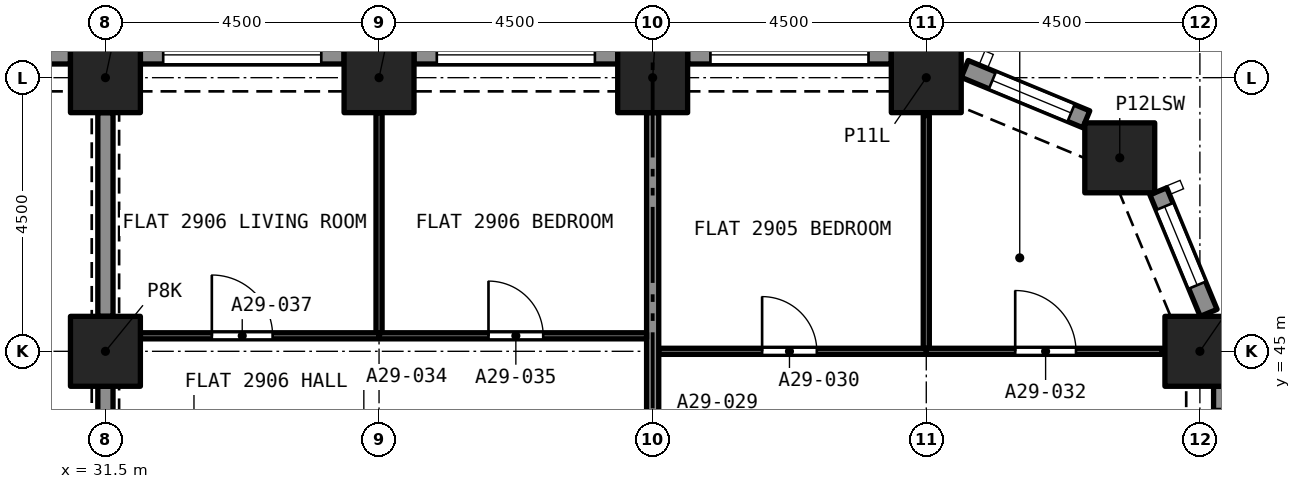
"""IFC4 building model, lengths in metres.
Left out: names, types, materials, properties, quantities, classifications, styles, units other than length and angle.
Written with IfcOpenShell. Run it as: python <this file> out.ifc"""

import sys

from ifc_helpers import new_model, si_unit, direction, frame, frame_2d, origin, origin_2d, place, context, subcontext, project, spatial, rectangle, extrude, element, fill, save


model = new_model("IFC4")
c1 = context("Model", 3, precision=1e-05, world=origin(), true_north=direction((0.0, 1.0)))
c2 = subcontext(c1, "Body", "Model", "MODEL_VIEW")
j1 = project(units=[si_unit("LENGTHUNIT", "METRE"), si_unit("PLANEANGLEUNIT", "RADIAN")], contexts=[c1])
p1 = place(None, origin())
s1 = spatial("IfcSite", under=j1, at=p1, CompositionType="ELEMENT")
p2 = place(p1, origin())
s2 = spatial("IfcBuilding", under=s1, at=p2, CompositionType="ELEMENT")
p3 = place(p2, frame((0.0, 0.0, 105.6)))
s3 = spatial("IfcBuildingStorey", under=s2, at=p3, CompositionType="ELEMENT", Elevation=105.6)
for number, where, z_axis, x_axis in (
    (1, (31.5, 45.0, 0.0), (0.0, 0.0, 1.0), (1.0, 0.0, 0.0)),
    (2, (49.5, 45.0, 0.0), (0.0, 0.0, 1.0), (1.0, 0.0, 0.0)),
    (3, (48.182, 48.182, 0.0), (0.0, 0.0, 1.0), (1.0, 0.0, 0.0)),
    (4, (31.5, 49.5, 0.0), (0.0, 0.0, 1.0), (1.0, 0.0, 0.0)),
    (5, (36.0, 49.5, 0.0), (0.0, 0.0, 1.0), (1.0, 0.0, 0.0)),
    (6, (40.5, 49.5, 0.0), (0.0, 0.0, 1.0), (1.0, 0.0, 0.0)),
    (7, (45.0, 49.5, 0.0), (0.0, 0.0, 1.0), (1.0, 0.0, 0.0)),
):
    element("IfcColumn", number, at=place(p3, frame(where, z_axis=z_axis, x_axis=x_axis)), inside=s3, PredefinedType="COLUMN", context=c2, shape_type="SweptSolid", body=[
        extrude(rectangle(XDim=1.15, YDim=1.15, at=origin_2d()), origin(), (0.0, 0.0, 1.0), 3.2),
    ])
p4 = place(p3, frame((49.875, 44.425, 0.0), z_axis=(0.0, 0.0, 1.0), x_axis=(0.0, -1.0, 0.0)))
e8 = element("IfcWall", 8, at=p4, inside=s3, PredefinedType="SOLIDWALL", context=c2, shape_type="SweptSolid", body=[
    extrude(rectangle(XDim=3.35, YDim=0.3, at=frame_2d((1.675, 0.0))), origin(), (0.0, 0.0, 1.0), 3.2),
])
p5 = place(p4, frame((0.375, 0.0, 0.45)))
e9 = element("IfcOpeningElement", 9, at=p5, cuts=e8, PredefinedType="OPENING", context=c2, shape_type="SweptSolid", body=[
    extrude(rectangle(XDim=2.6, YDim=1.95, at=frame_2d((1.3, 0.975))), frame((0.0, 0.16, 0.0), z_axis=(0.0, -1.0, 0.0), x_axis=(1.0, 0.0, 0.0)), (0.0, 0.0, 1.0), 0.32),
])
p6 = place(p3, frame((48.816, 47.631, 0.0), z_axis=(0.0, 0.0, 1.0), x_axis=(0.382723818695, -0.923862802911, 0.0)))
e10 = element("IfcWall", 10, at=p6, inside=s3, PredefinedType="SOLIDWALL", context=c2, shape_type="SweptSolid", body=[
    extrude(rectangle(XDim=2.164, YDim=0.3, at=frame_2d((1.082, 0.0))), origin(), (0.0, 0.0, 1.0), 3.2),
])
p7 = place(p6, frame((0.271, 0.0, 0.45)))
e11 = element("IfcOpeningElement", 11, at=p7, cuts=e10, PredefinedType="OPENING", context=c2, shape_type="SweptSolid", body=[
    extrude(rectangle(XDim=1.4, YDim=1.95, at=frame_2d((0.7, 0.975))), frame((0.0, 0.16, 0.0), z_axis=(0.0, -1.0, 0.0), x_axis=(1.0, 0.0, 0.0)), (0.0, 0.0, 1.0), 0.32),
])
p8 = place(p3, frame((45.632, 49.644, 0.0), z_axis=(0.0, 0.0, 1.0), x_axis=(0.923862802911, -0.382723818695, 0.0)))
e12 = element("IfcWall", 12, at=p8, inside=s3, PredefinedType="SOLIDWALL", context=c2, shape_type="SweptSolid", body=[
    extrude(rectangle(XDim=2.164, YDim=0.3, at=frame_2d((1.082, 0.0))), origin(), (0.0, 0.0, 1.0), 3.2),
])
p9 = place(p8, frame((0.493, 0.0, 0.45)))
e13 = element("IfcOpeningElement", 13, at=p9, cuts=e12, PredefinedType="OPENING", context=c2, shape_type="SweptSolid", body=[
    extrude(rectangle(XDim=1.4, YDim=1.95, at=frame_2d((0.7, 0.975))), frame((0.0, 0.16, 0.0), z_axis=(0.0, -1.0, 0.0), x_axis=(1.0, 0.0, 0.0)), (0.0, 0.0, 1.0), 0.32),
])
p10 = place(p3, frame((41.075, 49.875, 0.0), z_axis=(0.0, 0.0, 1.0), x_axis=(1.0, 0.0, 0.0)))
e14 = element("IfcWall", 14, at=p10, inside=s3, PredefinedType="SOLIDWALL", context=c2, shape_type="SweptSolid", body=[
    extrude(rectangle(XDim=3.35, YDim=0.3, at=frame_2d((1.675, 0.0))), origin(), (0.0, 0.0, 1.0), 3.2),
])
p11 = place(p10, frame((0.375, 0.0, 0.45)))
e15 = element("IfcOpeningElement", 15, at=p11, cuts=e14, PredefinedType="OPENING", context=c2, shape_type="SweptSolid", body=[
    extrude(rectangle(XDim=2.6, YDim=1.95, at=frame_2d((1.3, 0.975))), frame((0.0, 0.16, 0.0), z_axis=(0.0, -1.0, 0.0), x_axis=(1.0, 0.0, 0.0)), (0.0, 0.0, 1.0), 0.32),
])
p12 = place(p3, frame((36.575, 49.875, 0.0), z_axis=(0.0, 0.0, 1.0), x_axis=(1.0, 0.0, 0.0)))
e16 = element("IfcWall", 16, at=p12, inside=s3, PredefinedType="SOLIDWALL", context=c2, shape_type="SweptSolid", body=[
    extrude(rectangle(XDim=3.35, YDim=0.3, at=frame_2d((1.675, 0.0))), origin(), (0.0, 0.0, 1.0), 3.2),
])
p13 = place(p12, frame((0.375, 0.0, 0.45)))
e17 = element("IfcOpeningElement", 17, at=p13, cuts=e16, PredefinedType="OPENING", context=c2, shape_type="SweptSolid", body=[
    extrude(rectangle(XDim=2.6, YDim=1.95, at=frame_2d((1.3, 0.975))), frame((0.0, 0.16, 0.0), z_axis=(0.0, -1.0, 0.0), x_axis=(1.0, 0.0, 0.0)), (0.0, 0.0, 1.0), 0.32),
])
p14 = place(p3, frame((32.075, 49.875, 0.0), z_axis=(0.0, 0.0, 1.0), x_axis=(1.0, 0.0, 0.0)))
e18 = element("IfcWall", 18, at=p14, inside=s3, PredefinedType="SOLIDWALL", context=c2, shape_type="SweptSolid", body=[
    extrude(rectangle(XDim=3.35, YDim=0.3, at=frame_2d((1.675, 0.0))), origin(), (0.0, 0.0, 1.0), 3.2),
])
p15 = place(p14, frame((0.375, 0.0, 0.45)))
e19 = element("IfcOpeningElement", 19, at=p15, cuts=e18, PredefinedType="OPENING", context=c2, shape_type="SweptSolid", body=[
    extrude(rectangle(XDim=2.6, YDim=1.95, at=frame_2d((1.3, 0.975))), frame((0.0, 0.16, 0.0), z_axis=(0.0, -1.0, 0.0), x_axis=(1.0, 0.0, 0.0)), (0.0, 0.0, 1.0), 0.32),
])
p16 = place(p3, frame((27.575, 49.875, 0.0), z_axis=(0.0, 0.0, 1.0), x_axis=(1.0, 0.0, 0.0)))
e20 = element("IfcWall", 20, at=p16, inside=s3, PredefinedType="SOLIDWALL", context=c2, shape_type="SweptSolid", body=[
    extrude(rectangle(XDim=3.35, YDim=0.3, at=frame_2d((1.675, 0.0))), origin(), (0.0, 0.0, 1.0), 3.2),
])
p17 = place(p16, frame((0.375, 0.0, 0.45)))
e21 = element("IfcOpeningElement", 21, at=p17, cuts=e20, PredefinedType="OPENING", context=c2, shape_type="SweptSolid", body=[
    extrude(rectangle(XDim=2.6, YDim=1.95, at=frame_2d((1.3, 0.975))), frame((0.0, 0.16, 0.0), z_axis=(0.0, -1.0, 0.0), x_axis=(1.0, 0.0, 0.0)), (0.0, 0.0, 1.0), 0.32),
])
p18 = place(p3, frame((40.6, 45.0, 0.0), z_axis=(0.0, 0.0, 1.0), x_axis=(1.0, 0.0, 0.0)))
e22 = element("IfcWall", 22, at=p18, inside=s3, PredefinedType="PARTITIONING", context=c2, shape_type="SweptSolid", body=[
    extrude(rectangle(XDim=4.4, YDim=0.1, at=frame_2d((2.2, 0.0))), origin(), (0.0, 0.0, 1.0), 2.9),
])
p19 = place(p18, frame((1.7, 0.0, 0.0)))
e23 = element("IfcOpeningElement", 23, at=p19, cuts=e22, PredefinedType="OPENING", context=c2, shape_type="SweptSolid", body=[
    extrude(rectangle(XDim=0.9, YDim=2.1, at=frame_2d((0.45, 1.05))), frame((0.0, 0.06, 0.0), z_axis=(0.0, -1.0, 0.0), x_axis=(1.0, 0.0, 0.0)), (0.0, 0.0, 1.0), 0.12),
])
p20 = place(p3, frame((45.0, 45.05, 0.0), z_axis=(0.0, 0.0, 1.0), x_axis=(0.0, 1.0, 0.0)))
e24 = element("IfcWall", 24, at=p20, inside=s3, PredefinedType="PARTITIONING", context=c2, shape_type="SweptSolid", body=[
    extrude(rectangle(XDim=3.828, YDim=0.1, at=frame_2d((1.914, 0.0))), origin(), (0.0, 0.0, 1.0), 2.9),
])
p21 = place(p3, frame((45.0, 45.0, 0.0), z_axis=(0.0, 0.0, 1.0), x_axis=(1.0, 0.0, 0.0)))
e25 = element("IfcWall", 25, at=p21, inside=s3, PredefinedType="PARTITIONING", context=c2, shape_type="SweptSolid", body=[
    extrude(rectangle(XDim=3.878, YDim=0.1, at=frame_2d((1.939, 0.0))), origin(), (0.0, 0.0, 1.0), 2.9),
])
p22 = place(p21, frame((1.462, 0.0, 0.0)))
e26 = element("IfcOpeningElement", 26, at=p22, cuts=e25, PredefinedType="OPENING", context=c2, shape_type="SweptSolid", body=[
    extrude(rectangle(XDim=1.0, YDim=2.1, at=frame_2d((0.5, 1.05))), frame((0.0, 0.06, 0.0), z_axis=(0.0, -1.0, 0.0), x_axis=(1.0, 0.0, 0.0)), (0.0, 0.0, 1.0), 0.12),
])
p23 = place(p3, frame((40.5, 43.825, 0.0), z_axis=(0.0, 0.0, 1.0), x_axis=(0.0, 1.0, 0.0)))
e27 = element("IfcWall", 27, at=p23, inside=s3, PredefinedType="PARTITIONING", context=c2, shape_type="SweptSolid", body=[
    extrude(rectangle(XDim=5.1, YDim=0.2, at=frame_2d((2.55, 0.0))), origin(), (0.0, 0.0, 1.0), 2.9),
])
p24 = place(p3, frame((36.0, 45.255, 0.0), z_axis=(0.0, 0.0, 1.0), x_axis=(1.0, 0.0, 0.0)))
e28 = element("IfcWall", 28, at=p24, inside=s3, PredefinedType="PARTITIONING", context=c2, shape_type="SweptSolid", body=[
    extrude(rectangle(XDim=4.4, YDim=0.1, at=frame_2d((2.2, 0.0))), origin(), (0.0, 0.0, 1.0), 2.9),
])
p25 = place(p24, frame((1.8, 0.0, 0.0)))
e29 = element("IfcOpeningElement", 29, at=p25, cuts=e28, PredefinedType="OPENING", context=c2, shape_type="SweptSolid", body=[
    extrude(rectangle(XDim=0.9, YDim=2.1, at=frame_2d((0.45, 1.05))), frame((0.0, 0.06, 0.0), z_axis=(0.0, -1.0, 0.0), x_axis=(1.0, 0.0, 0.0)), (0.0, 0.0, 1.0), 0.12),
])
p26 = place(p3, frame((36.0, 45.305, 0.0), z_axis=(0.0, 0.0, 1.0), x_axis=(0.0, 1.0, 0.0)))
e30 = element("IfcWall", 30, at=p26, inside=s3, PredefinedType="PARTITIONING", context=c2, shape_type="SweptSolid", body=[
    extrude(rectangle(XDim=3.62, YDim=0.1, at=frame_2d((1.81, 0.0))), origin(), (0.0, 0.0, 1.0), 2.9),
])
p27 = place(p3, frame((32.075, 45.255, 0.0), z_axis=(0.0, 0.0, 1.0), x_axis=(1.0, 0.0, 0.0)))
e31 = element("IfcWall", 31, at=p27, inside=s3, PredefinedType="PARTITIONING", context=c2, shape_type="SweptSolid", body=[
    extrude(rectangle(XDim=3.925, YDim=0.1, at=frame_2d((1.962, 0.0))), origin(), (0.0, 0.0, 1.0), 2.9),
])
p28 = place(p27, frame((1.175, 0.0, 0.0)))
e32 = element("IfcOpeningElement", 32, at=p28, cuts=e31, PredefinedType="OPENING", context=c2, shape_type="SweptSolid", body=[
    extrude(rectangle(XDim=1.0, YDim=2.1, at=frame_2d((0.5, 1.05))), frame((0.0, 0.06, 0.0), z_axis=(0.0, -1.0, 0.0), x_axis=(1.0, 0.0, 0.0)), (0.0, 0.0, 1.0), 0.12),
])
for number, where, z_axis, x_axis in (
    (33, (31.5, 41.075, 0.0), (0.0, 0.0, 1.0), (0.0, 1.0, 0.0)),
    (34, (31.5, 45.575, 0.0), (0.0, 0.0, 1.0), (0.0, 1.0, 0.0)),
):
    element("IfcWall", number, at=place(p3, frame(where, z_axis=z_axis, x_axis=x_axis)), inside=s3, PredefinedType="PARTITIONING", context=c2, shape_type="SweptSolid", body=[
        extrude(rectangle(XDim=3.35, YDim=0.25, at=frame_2d((1.675, 0.0))), origin(), (0.0, 0.0, 1.0), 2.38),
    ])
p29 = place(p7, origin())
e35 = element("IfcWindow", 35, at=p29, inside=s3, PartitioningType="SINGLE_PANEL", PredefinedType="WINDOW", context=c2, shape_type="SweptSolid", body=[
    extrude(rectangle(XDim=1.4, YDim=1.95, at=frame_2d((0.7, 0.975))), frame((0.0, 0.03, 0.0), z_axis=(0.0, -1.0, 0.0), x_axis=(1.0, 0.0, 0.0)), (0.0, 0.0, 1.0), 0.06),
])
fill(e11, e35)
p30 = place(p9, origin())
e36 = element("IfcWindow", 36, at=p30, inside=s3, PartitioningType="SINGLE_PANEL", PredefinedType="WINDOW", context=c2, shape_type="SweptSolid", body=[
    extrude(rectangle(XDim=1.4, YDim=1.95, at=frame_2d((0.7, 0.975))), frame((0.0, 0.03, 0.0), z_axis=(0.0, -1.0, 0.0), x_axis=(1.0, 0.0, 0.0)), (0.0, 0.0, 1.0), 0.06),
])
fill(e13, e36)
p31 = place(p11, origin())
e37 = element("IfcWindow", 37, at=p31, inside=s3, PartitioningType="SINGLE_PANEL", PredefinedType="WINDOW", context=c2, shape_type="SweptSolid", body=[
    extrude(rectangle(XDim=2.6, YDim=1.95, at=frame_2d((1.3, 0.975))), frame((0.0, 0.03, 0.0), z_axis=(0.0, -1.0, 0.0), x_axis=(1.0, 0.0, 0.0)), (0.0, 0.0, 1.0), 0.06),
])
fill(e15, e37)
p32 = place(p13, origin())
e38 = element("IfcWindow", 38, at=p32, inside=s3, PartitioningType="SINGLE_PANEL", PredefinedType="WINDOW", context=c2, shape_type="SweptSolid", body=[
    extrude(rectangle(XDim=2.6, YDim=1.95, at=frame_2d((1.3, 0.975))), frame((0.0, 0.03, 0.0), z_axis=(0.0, -1.0, 0.0), x_axis=(1.0, 0.0, 0.0)), (0.0, 0.0, 1.0), 0.06),
])
fill(e17, e38)
p33 = place(p15, origin())
e39 = element("IfcWindow", 39, at=p33, inside=s3, PartitioningType="SINGLE_PANEL", PredefinedType="WINDOW", context=c2, shape_type="SweptSolid", body=[
    extrude(rectangle(XDim=2.6, YDim=1.95, at=frame_2d((1.3, 0.975))), frame((0.0, 0.03, 0.0), z_axis=(0.0, -1.0, 0.0), x_axis=(1.0, 0.0, 0.0)), (0.0, 0.0, 1.0), 0.06),
])
fill(e19, e39)
p34 = place(p19, origin())
e40 = element("IfcDoor", 40, at=p34, inside=s3, OperationType="SINGLE_SWING_LEFT", PredefinedType="DOOR", context=c2, shape_type="SweptSolid", body=[
    extrude(rectangle(XDim=0.9, YDim=2.1, at=frame_2d((0.45, 1.05))), frame((0.0, 0.025, 0.0), z_axis=(0.0, -1.0, 0.0), x_axis=(1.0, 0.0, 0.0)), (0.0, 0.0, 1.0), 0.05),
])
fill(e23, e40)
p35 = place(p22, origin())
e41 = element("IfcDoor", 41, at=p35, inside=s3, OperationType="SINGLE_SWING_RIGHT", PredefinedType="DOOR", context=c2, shape_type="SweptSolid", body=[
    extrude(rectangle(XDim=1.0, YDim=2.1, at=frame_2d((0.5, 1.05))), frame((0.0, 0.025, 0.0), z_axis=(0.0, -1.0, 0.0), x_axis=(1.0, 0.0, 0.0)), (0.0, 0.0, 1.0), 0.05),
])
fill(e26, e41)
p36 = place(p25, origin())
e42 = element("IfcDoor", 42, at=p36, inside=s3, OperationType="SINGLE_SWING_RIGHT", PredefinedType="DOOR", context=c2, shape_type="SweptSolid", body=[
    extrude(rectangle(XDim=0.9, YDim=2.1, at=frame_2d((0.45, 1.05))), frame((0.0, 0.025, 0.0), z_axis=(0.0, -1.0, 0.0), x_axis=(1.0, 0.0, 0.0)), (0.0, 0.0, 1.0), 0.05),
])
fill(e29, e42)
p37 = place(p28, origin())
e43 = element("IfcDoor", 43, at=p37, inside=s3, OperationType="SINGLE_SWING_LEFT", PredefinedType="DOOR", context=c2, shape_type="SweptSolid", body=[
    extrude(rectangle(XDim=1.0, YDim=2.1, at=frame_2d((0.5, 1.05))), frame((0.0, 0.025, 0.0), z_axis=(0.0, -1.0, 0.0), x_axis=(1.0, 0.0, 0.0)), (0.0, 0.0, 1.0), 0.05),
])
fill(e32, e43)
save(model, sys.argv[1])
